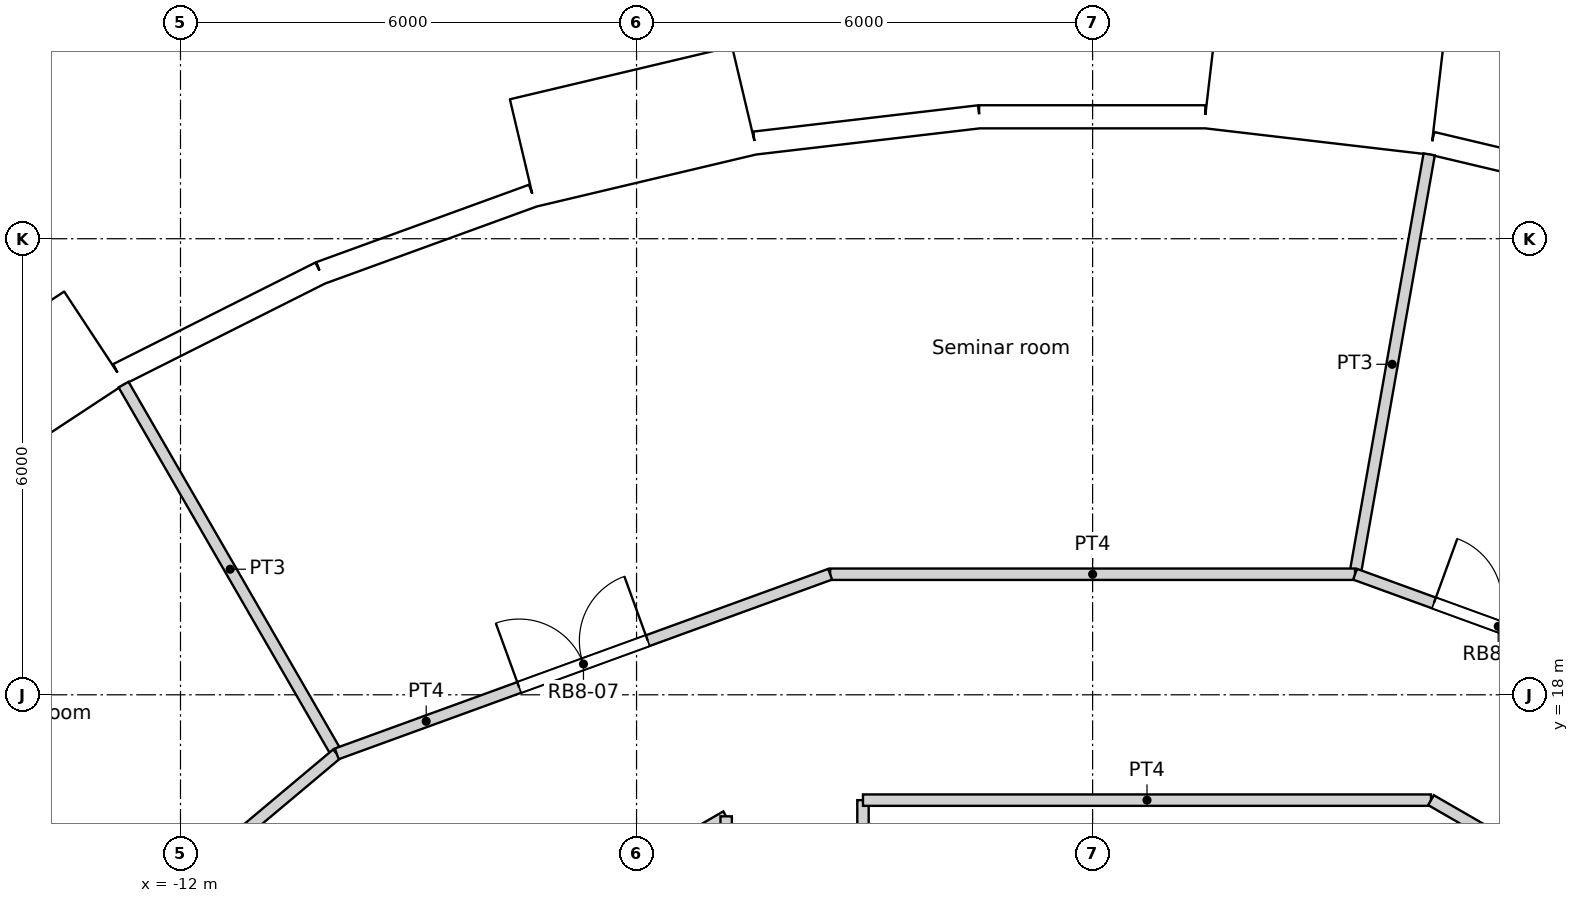
"""IFC4 building model, lengths in metres.
Left out: names, types, materials, properties, quantities, classifications, styles, units other than length and angle.
Written with IfcOpenShell. Run it as: python <this file> out.ifc"""

import sys

from ifc_helpers import new_model, si_unit, direction, frame, frame_2d, origin, origin_2d, place, context, subcontext, project, spatial, rectangle, circle, extrude, element, fill, save


model = new_model("IFC4")
c1 = context("Model", 3, precision=1e-05, world=origin(), true_north=direction((0.0, 1.0)))
c2 = subcontext(c1, "Body", "Model", "MODEL_VIEW")
j1 = project(units=[si_unit("LENGTHUNIT", "METRE"), si_unit("PLANEANGLEUNIT", "RADIAN")], contexts=[c1])
p1 = place(None, origin())
s1 = spatial("IfcSite", under=j1, at=p1, CompositionType="ELEMENT")
p2 = place(p1, origin())
s2 = spatial("IfcBuilding", under=s1, at=p2, CompositionType="ELEMENT")
p3 = place(p2, frame((0.0, 0.0, 201.6)))
s3 = spatial("IfcBuildingStorey", under=s2, at=p3, CompositionType="ELEMENT", Elevation=201.6)
for number, where, z_axis, x_axis in (
    (1, (4.263, 24.175, 0.0), (0.0, 0.0, 1.0), (1.0, 0.0, 0.0)),
    (2, (-1.427, 24.506, 0.0), (0.0, 0.0, 1.0), (1.0, 0.0, 0.0)),
    (3, (-7.04, 23.516, 0.0), (0.0, 0.0, 1.0), (1.0, 0.0, 0.0)),
    (4, (-12.274, 21.259, 0.0), (0.0, 0.0, 1.0), (1.0, 0.0, 0.0)),
):
    element("IfcColumn", number, at=place(p3, frame(where, z_axis=z_axis, x_axis=x_axis)), inside=s3, PredefinedType="COLUMN", context=c2, shape_type="SweptSolid", body=[
        extrude(circle(Radius=0.6, at=origin_2d()), origin(), (0.0, 0.0, 1.0), 3.6),
    ])
for number, where, z_axis, x_axis in (
    (5, (1.406, 18.77, 0.0), (0.0, 0.0, 1.0), (1.0, 0.0, 0.0)),
    (6, (-4.188, 18.35, 0.0), (0.0, 0.0, 1.0), (1.0, 0.0, 0.0)),
    (7, (-9.411, 16.301, 0.0), (0.0, 0.0, 1.0), (1.0, 0.0, 0.0)),
):
    element("IfcColumn", number, at=place(p3, frame(where, z_axis=z_axis, x_axis=x_axis)), inside=s3, PredefinedType="COLUMN", context=c2, shape_type="SweptSolid", body=[
        extrude(circle(Radius=0.65, at=origin_2d()), origin(), (0.0, 0.0, 1.0), 3.6),
    ])
p4 = place(p3, frame((7.356, 24.57, 0.0), z_axis=(0.0, 0.0, 1.0), x_axis=(-0.973045378923, 0.230613725862, 0.0)))
e8 = element("IfcWall", 8, at=p4, inside=s3, PredefinedType="SOLIDWALL", context=c2, shape_type="SweptSolid", body=[
    extrude(rectangle(XDim=2.973, YDim=0.3, at=frame_2d((1.486, 0.0))), origin(), (0.0, 0.0, 1.0), 3.3),
])
p5 = place(p4, frame((1.486, 0.0, 1.55)))
e9 = element("IfcOpeningElement", 9, at=p5, cuts=e8, PredefinedType="OPENING", context=c2, shape_type="SweptSolid", body=[
    extrude(circle(Radius=0.9, at=origin_2d()), frame((0.0, 0.16, 0.0), z_axis=(0.0, -1.0, 0.0), x_axis=(1.0, 0.0, 0.0)), (0.0, 0.0, 1.0), 0.32),
])
p6 = place(p3, frame((4.529, 25.828, -0.3), z_axis=(0.0, 0.0, 1.0), x_axis=(-0.9932342274, 0.116128246006, 0.0)))
e10 = element("IfcWall", 10, at=p6, inside=s3, PredefinedType="ELEMENTEDWALL", context=c2, shape_type="SweptSolid", body=[
    extrude(rectangle(XDim=3.0, YDim=1.45, at=frame_2d((1.5, 0.0))), origin(), (0.0, 0.0, 1.0), 3.6),
])
p7 = place(p6, frame((1.5, 0.0, 1.85)))
e11 = element("IfcOpeningElement", 11, at=p7, cuts=e10, PredefinedType="OPENING", context=c2, shape_type="SweptSolid", body=[
    extrude(circle(Radius=0.9, at=origin_2d()), frame((0.0, 0.735, 0.0), z_axis=(0.0, -1.0, 0.0), x_axis=(1.0, 0.0, 0.0)), (0.0, 0.0, 1.0), 1.47),
])
p8 = place(p3, frame((1.482, 25.604, 0.0), z_axis=(0.0, 0.0, 1.0), x_axis=(-1.0, 0.0, 0.0)))
e12 = element("IfcWall", 12, at=p8, inside=s3, PredefinedType="SOLIDWALL", context=c2, shape_type="SweptSolid", body=[
    extrude(rectangle(XDim=2.973, YDim=0.3, at=frame_2d((1.486, 0.0))), origin(), (0.0, 0.0, 1.0), 3.3),
])
p9 = place(p8, frame((1.486, 0.0, 1.55)))
e13 = element("IfcOpeningElement", 13, at=p9, cuts=e12, PredefinedType="OPENING", context=c2, shape_type="SweptSolid", body=[
    extrude(circle(Radius=0.9, at=origin_2d()), frame((0.0, 0.16, 0.0), z_axis=(0.0, -1.0, 0.0), x_axis=(1.0, 0.0, 0.0)), (0.0, 0.0, 1.0), 0.32),
])
p10 = place(p3, frame((-1.491, 25.604, 0.0), z_axis=(0.0, 0.0, 1.0), x_axis=(-0.993245010522, -0.1160359818, 0.0)))
e14 = element("IfcWall", 14, at=p10, inside=s3, PredefinedType="SOLIDWALL", context=c2, shape_type="SweptSolid", body=[
    extrude(rectangle(XDim=2.973, YDim=0.3, at=frame_2d((1.486, 0.0))), origin(), (0.0, 0.0, 1.0), 3.3),
])
p11 = place(p10, frame((1.486, 0.0, 1.55)))
e15 = element("IfcOpeningElement", 15, at=p11, cuts=e14, PredefinedType="OPENING", context=c2, shape_type="SweptSolid", body=[
    extrude(circle(Radius=0.9, at=origin_2d()), frame((0.0, 0.16, 0.0), z_axis=(0.0, -1.0, 0.0), x_axis=(1.0, 0.0, 0.0)), (0.0, 0.0, 1.0), 0.32),
])
p12 = place(p3, frame((-4.578, 25.819, -0.3), z_axis=(0.0, 0.0, 1.0), x_axis=(-0.973042333261, -0.23062657627, 0.0)))
e16 = element("IfcWall", 16, at=p12, inside=s3, PredefinedType="ELEMENTEDWALL", context=c2, shape_type="SweptSolid", body=[
    extrude(rectangle(XDim=3.0, YDim=1.45, at=frame_2d((1.5, 0.0))), origin(), (0.0, 0.0, 1.0), 3.6),
])
p13 = place(p12, frame((1.5, 0.0, 1.85)))
e17 = element("IfcOpeningElement", 17, at=p13, cuts=e16, PredefinedType="OPENING", context=c2, shape_type="SweptSolid", body=[
    extrude(circle(Radius=0.9, at=origin_2d()), frame((0.0, 0.735, 0.0), z_axis=(0.0, -1.0, 0.0), x_axis=(1.0, 0.0, 0.0)), (0.0, 0.0, 1.0), 1.47),
])
p14 = place(p3, frame((-7.365, 24.567, 0.0), z_axis=(0.0, 0.0, 1.0), x_axis=(-0.939690282133, -0.342026568652, 0.0)))
e18 = element("IfcWall", 18, at=p14, inside=s3, PredefinedType="SOLIDWALL", context=c2, shape_type="SweptSolid", body=[
    extrude(rectangle(XDim=2.973, YDim=0.3, at=frame_2d((1.486, 0.0))), origin(), (0.0, 0.0, 1.0), 3.3),
])
p15 = place(p14, frame((1.486, 0.0, 1.55)))
e19 = element("IfcOpeningElement", 19, at=p15, cuts=e18, PredefinedType="OPENING", context=c2, shape_type="SweptSolid", body=[
    extrude(circle(Radius=0.9, at=origin_2d()), frame((0.0, 0.16, 0.0), z_axis=(0.0, -1.0, 0.0), x_axis=(1.0, 0.0, 0.0)), (0.0, 0.0, 1.0), 0.32),
])
p16 = place(p3, frame((-10.158, 23.55, 0.0), z_axis=(0.0, 0.0, 1.0), x_axis=(-0.893637442555, -0.448789618045, 0.0)))
e20 = element("IfcWall", 20, at=p16, inside=s3, PredefinedType="SOLIDWALL", context=c2, shape_type="SweptSolid", body=[
    extrude(rectangle(XDim=2.973, YDim=0.3, at=frame_2d((1.486, 0.0))), origin(), (0.0, 0.0, 1.0), 3.3),
])
p17 = place(p16, frame((1.486, 0.0, 1.55)))
e21 = element("IfcOpeningElement", 21, at=p17, cuts=e20, PredefinedType="OPENING", context=c2, shape_type="SweptSolid", body=[
    extrude(circle(Radius=0.9, at=origin_2d()), frame((0.0, 0.16, 0.0), z_axis=(0.0, -1.0, 0.0), x_axis=(1.0, 0.0, 0.0)), (0.0, 0.0, 1.0), 0.32),
])
p18 = place(p3, frame((-13.132, 22.697, -0.3), z_axis=(0.0, 0.0, 1.0), x_axis=(-0.835514416706, -0.549468524554, 0.0)))
e22 = element("IfcWall", 22, at=p18, inside=s3, PredefinedType="ELEMENTEDWALL", context=c2, shape_type="SweptSolid", body=[
    extrude(rectangle(XDim=3.0, YDim=1.45, at=frame_2d((1.5, 0.0))), origin(), (0.0, 0.0, 1.0), 3.6),
])
p19 = place(p18, frame((1.5, 0.0, 1.85)))
e23 = element("IfcOpeningElement", 23, at=p19, cuts=e22, PredefinedType="OPENING", context=c2, shape_type="SweptSolid", body=[
    extrude(circle(Radius=0.9, at=origin_2d()), frame((0.0, 0.735, 0.0), z_axis=(0.0, -1.0, 0.0), x_axis=(1.0, 0.0, 0.0)), (0.0, 0.0, 1.0), 1.47),
])
p20 = place(p3, frame((-4.821, 10.3, 0.0), z_axis=(0.0, 0.0, 1.0), x_axis=(0.0, 1.0, 0.0)))
e24 = element("IfcWall", 24, at=p20, inside=s3, PredefinedType="PARTITIONING", context=c2, shape_type="SweptSolid", body=[
    extrude(rectangle(XDim=6.101, YDim=0.15, at=frame_2d((3.05, 0.0))), origin(), (0.0, 0.0, 1.0), 3.3),
])
p21 = place(p3, frame((-12.162, 12.162, 0.0), z_axis=(0.0, 0.0, 1.0), x_axis=(0.866004766557, 0.500035743023, 0.0)))
e25 = element("IfcWall", 25, at=p21, inside=s3, PredefinedType="PARTITIONING", context=c2, shape_type="SweptSolid", body=[
    extrude(rectangle(XDim=8.477, YDim=0.15, at=frame_2d((4.239, 0.0))), origin(), (0.0, 0.0, 1.0), 3.3),
])
p22 = place(p21, frame((3.739, 0.0, 0.0)))
e26 = element("IfcOpeningElement", 26, at=p22, cuts=e25, PredefinedType="OPENING", context=c2, shape_type="SweptSolid", body=[
    extrude(rectangle(XDim=1.0, YDim=2.04, at=frame_2d((0.5, 1.02))), frame((0.0, 0.075, 0.0), z_axis=(0.0, -1.0, 0.0), x_axis=(1.0, 0.0, 0.0)), (0.0, 0.0, 1.0), 0.15),
])
p23 = place(p3, frame((4.452, 16.614, 0.0), z_axis=(0.0, 0.0, 1.0), x_axis=(0.866005203721, -0.500034985904, 0.0)))
e27 = element("IfcWall", 27, at=p23, inside=s3, PredefinedType="PARTITIONING", context=c2, shape_type="SweptSolid", body=[
    extrude(rectangle(XDim=8.903, YDim=0.15, at=frame_2d((4.452, 0.0))), origin(), (0.0, 0.0, 1.0), 3.3),
])
p24 = place(p3, frame((-3.021, 16.614, 0.0), z_axis=(0.0, 0.0, 1.0), x_axis=(1.0, 0.0, 0.0)))
e28 = element("IfcWall", 28, at=p24, inside=s3, PredefinedType="PARTITIONING", context=c2, shape_type="SweptSolid", body=[
    extrude(rectangle(XDim=7.473, YDim=0.15, at=frame_2d((3.736, 0.0))), origin(), (0.0, 0.0, 1.0), 3.3),
])
p25 = place(p3, frame((-3.021, 10.3, 0.0), z_axis=(0.0, 0.0, 1.0), x_axis=(0.0, 1.0, 0.0)))
e29 = element("IfcWall", 29, at=p25, inside=s3, PredefinedType="PARTITIONING", context=c2, shape_type="SweptSolid", body=[
    extrude(rectangle(XDim=6.314, YDim=0.15, at=frame_2d((3.157, 0.0))), origin(), (0.0, 0.0, 1.0), 3.3),
])
p26 = place(p3, frame((3.453, 19.586, 0.0), z_axis=(0.0, 0.0, 1.0), x_axis=(0.939672634566, -0.342075050021, 0.0)))
e30 = element("IfcWall", 30, at=p26, inside=s3, PredefinedType="PARTITIONING", context=c2, shape_type="SweptSolid", body=[
    extrude(rectangle(XDim=6.908, YDim=0.15, at=frame_2d((3.454, 0.0))), origin(), (0.0, 0.0, 1.0), 3.3),
])
p27 = place(p26, frame((1.104, 0.0, 0.0)))
e31 = element("IfcOpeningElement", 31, at=p27, cuts=e30, PredefinedType="OPENING", context=c2, shape_type="SweptSolid", body=[
    extrude(rectangle(XDim=1.8, YDim=2.1, at=frame_2d((0.9, 1.05))), frame((0.0, 0.075, 0.0), z_axis=(0.0, -1.0, 0.0), x_axis=(1.0, 0.0, 0.0)), (0.0, 0.0, 1.0), 0.15),
])
p28 = place(p3, frame((-9.944, 17.223, 0.0), z_axis=(0.0, 0.0, 1.0), x_axis=(0.939672634566, 0.342075050021, 0.0)))
e32 = element("IfcWall", 32, at=p28, inside=s3, PredefinedType="PARTITIONING", context=c2, shape_type="SweptSolid", body=[
    extrude(rectangle(XDim=6.908, YDim=0.15, at=frame_2d((3.454, 0.0))), origin(), (0.0, 0.0, 1.0), 3.3),
])
p29 = place(p28, frame((2.554, 0.0, 0.0)))
e33 = element("IfcOpeningElement", 33, at=p29, cuts=e32, PredefinedType="OPENING", context=c2, shape_type="SweptSolid", body=[
    extrude(rectangle(XDim=1.8, YDim=2.1, at=frame_2d((0.9, 1.05))), frame((0.0, 0.075, 0.0), z_axis=(0.0, -1.0, 0.0), x_axis=(1.0, 0.0, 0.0)), (0.0, 0.0, 1.0), 0.15),
])
p30 = place(p3, frame((-3.453, 19.586, 0.0), z_axis=(0.0, 0.0, 1.0), x_axis=(1.0, 0.0, 0.0)))
e34 = element("IfcWall", 34, at=p30, inside=s3, PredefinedType="PARTITIONING", context=c2, shape_type="SweptSolid", body=[
    extrude(rectangle(XDim=6.906, YDim=0.15, at=frame_2d((3.453, 0.0))), origin(), (0.0, 0.0, 1.0), 3.3),
])
p31 = place(p3, frame((-15.235, 12.784, 0.0), z_axis=(0.0, 0.0, 1.0), x_axis=(0.766064078986, 0.642764207845, 0.0)))
e35 = element("IfcWall", 35, at=p31, inside=s3, PredefinedType="PARTITIONING", context=c2, shape_type="SweptSolid", body=[
    extrude(rectangle(XDim=6.906, YDim=0.15, at=frame_2d((3.453, 0.0))), origin(), (0.0, 0.0, 1.0), 3.3),
])
p32 = place(p3, frame((3.453, 19.586, 0.0), z_axis=(0.0, 0.0, 1.0), x_axis=(0.17382754149, 0.984776109489, 0.0)))
e36 = element("IfcWall", 36, at=p32, inside=s3, PredefinedType="PARTITIONING", context=c2, shape_type="SweptSolid", body=[
    extrude(rectangle(XDim=5.61, YDim=0.15, at=frame_2d((2.805, 0.0))), origin(), (0.0, 0.0, 1.0), 3.3),
])
p33 = place(p3, frame((-12.749, 22.081, 0.0), z_axis=(0.0, 0.0, 1.0), x_axis=(0.500010020406, -0.866019618423, 0.0)))
e37 = element("IfcWall", 37, at=p33, inside=s3, PredefinedType="PARTITIONING", context=c2, shape_type="SweptSolid", body=[
    extrude(rectangle(XDim=5.61, YDim=0.15, at=frame_2d((2.805, 0.0))), origin(), (0.0, 0.0, 1.0), 3.3),
])
p34 = place(p5, origin())
e38 = element("IfcWindow", 38, at=p34, inside=s3, PartitioningType="SINGLE_PANEL", PredefinedType="WINDOW", context=c2, shape_type="SweptSolid", body=[
    extrude(circle(Radius=0.9, at=origin_2d()), frame((0.0, 0.12, 0.0), z_axis=(0.0, -1.0, 0.0), x_axis=(1.0, 0.0, 0.0)), (0.0, 0.0, 1.0), 0.1),
])
fill(e9, e38)
p35 = place(p7, origin())
e39 = element("IfcWindow", 39, at=p35, inside=s3, PartitioningType="SINGLE_PANEL", PredefinedType="WINDOW", context=c2, shape_type="SweptSolid", body=[
    extrude(circle(Radius=0.9, at=origin_2d()), frame((0.0, 0.695, 0.0), z_axis=(0.0, -1.0, 0.0), x_axis=(1.0, 0.0, 0.0)), (0.0, 0.0, 1.0), 0.1),
])
fill(e11, e39)
p36 = place(p9, origin())
e40 = element("IfcWindow", 40, at=p36, inside=s3, PartitioningType="SINGLE_PANEL", PredefinedType="WINDOW", context=c2, shape_type="SweptSolid", body=[
    extrude(circle(Radius=0.9, at=origin_2d()), frame((0.0, 0.12, 0.0), z_axis=(0.0, -1.0, 0.0), x_axis=(1.0, 0.0, 0.0)), (0.0, 0.0, 1.0), 0.1),
])
fill(e13, e40)
p37 = place(p11, origin())
e41 = element("IfcWindow", 41, at=p37, inside=s3, PartitioningType="SINGLE_PANEL", PredefinedType="WINDOW", context=c2, shape_type="SweptSolid", body=[
    extrude(circle(Radius=0.9, at=origin_2d()), frame((0.0, 0.12, 0.0), z_axis=(0.0, -1.0, 0.0), x_axis=(1.0, 0.0, 0.0)), (0.0, 0.0, 1.0), 0.1),
])
fill(e15, e41)
p38 = place(p13, origin())
e42 = element("IfcWindow", 42, at=p38, inside=s3, PartitioningType="SINGLE_PANEL", PredefinedType="WINDOW", context=c2, shape_type="SweptSolid", body=[
    extrude(circle(Radius=0.9, at=origin_2d()), frame((0.0, 0.695, 0.0), z_axis=(0.0, -1.0, 0.0), x_axis=(1.0, 0.0, 0.0)), (0.0, 0.0, 1.0), 0.1),
])
fill(e17, e42)
p39 = place(p15, origin())
e43 = element("IfcWindow", 43, at=p39, inside=s3, PartitioningType="SINGLE_PANEL", PredefinedType="WINDOW", context=c2, shape_type="SweptSolid", body=[
    extrude(circle(Radius=0.9, at=origin_2d()), frame((0.0, 0.12, 0.0), z_axis=(0.0, -1.0, 0.0), x_axis=(1.0, 0.0, 0.0)), (0.0, 0.0, 1.0), 0.1),
])
fill(e19, e43)
p40 = place(p17, origin())
e44 = element("IfcWindow", 44, at=p40, inside=s3, PartitioningType="SINGLE_PANEL", PredefinedType="WINDOW", context=c2, shape_type="SweptSolid", body=[
    extrude(circle(Radius=0.9, at=origin_2d()), frame((0.0, 0.12, 0.0), z_axis=(0.0, -1.0, 0.0), x_axis=(1.0, 0.0, 0.0)), (0.0, 0.0, 1.0), 0.1),
])
fill(e21, e44)
p41 = place(p19, origin())
e45 = element("IfcWindow", 45, at=p41, inside=s3, PartitioningType="SINGLE_PANEL", PredefinedType="WINDOW", context=c2, shape_type="SweptSolid", body=[
    extrude(circle(Radius=0.9, at=origin_2d()), frame((0.0, 0.695, 0.0), z_axis=(0.0, -1.0, 0.0), x_axis=(1.0, 0.0, 0.0)), (0.0, 0.0, 1.0), 0.1),
])
fill(e23, e45)
p42 = place(p27, origin())
e46 = element("IfcDoor", 46, at=p42, inside=s3, OperationType="DOUBLE_DOOR_SINGLE_SWING", PredefinedType="DOOR", context=c2, shape_type="SweptSolid", body=[
    extrude(rectangle(XDim=1.8, YDim=2.1, at=frame_2d((0.9, 1.05))), frame((0.0, 0.025, 0.0), z_axis=(0.0, -1.0, 0.0), x_axis=(1.0, 0.0, 0.0)), (0.0, 0.0, 1.0), 0.05),
])
fill(e31, e46)
p43 = place(p29, origin())
e47 = element("IfcDoor", 47, at=p43, inside=s3, OperationType="DOUBLE_DOOR_SINGLE_SWING", PredefinedType="DOOR", context=c2, shape_type="SweptSolid", body=[
    extrude(rectangle(XDim=1.8, YDim=2.1, at=frame_2d((0.9, 1.05))), frame((0.0, 0.025, 0.0), z_axis=(0.0, -1.0, 0.0), x_axis=(1.0, 0.0, 0.0)), (0.0, 0.0, 1.0), 0.05),
])
fill(e33, e47)
save(model, sys.argv[1])
